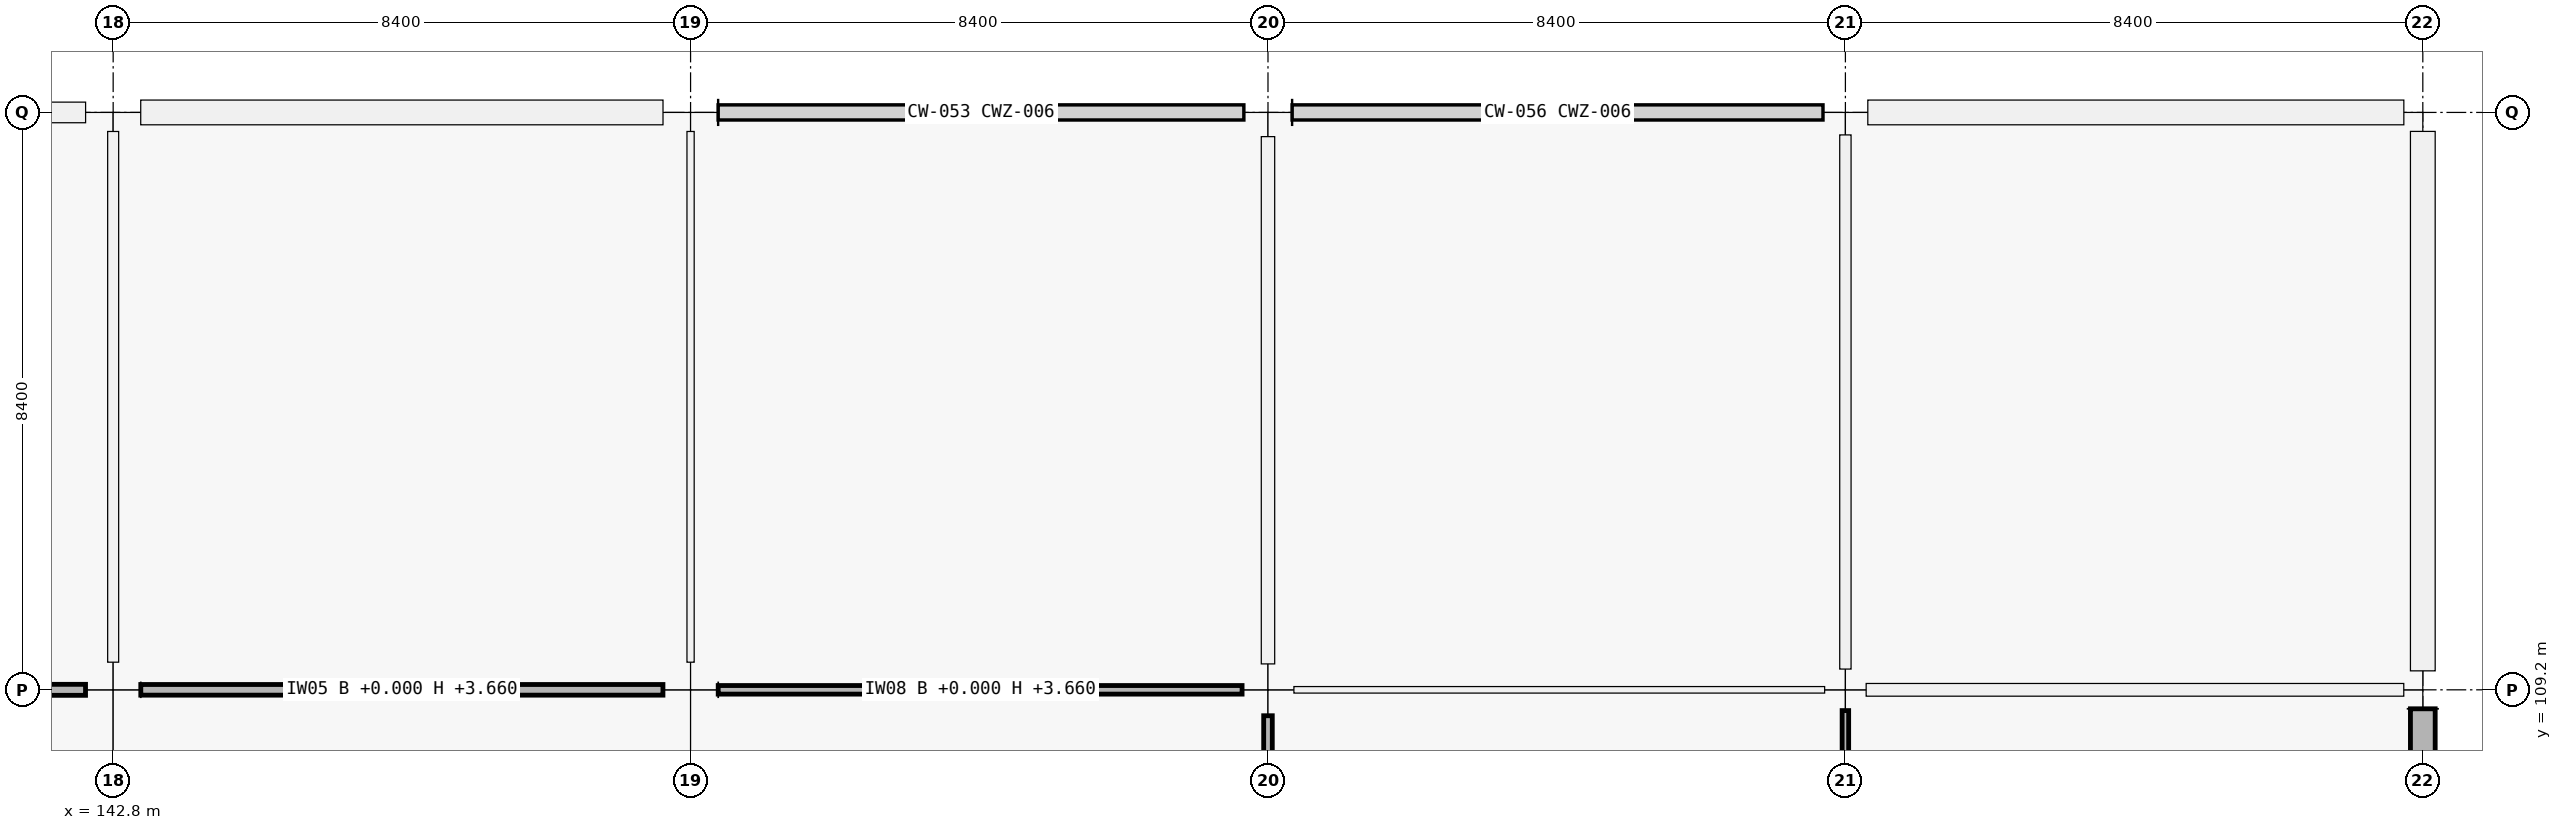
"""IFC4 building model, lengths in metres.
Left out: names, types, materials, properties, quantities, classifications, styles, units other than length and angle.
Written with IfcOpenShell. Run it as: python <this file> out.ifc"""

import sys

from ifc_helpers import new_model, si_unit, direction, frame, frame_2d, origin, origin_2d, place, context, subcontext, project, spatial, rectangle, extrude, element, fill, save


model = new_model("IFC4")
c1 = context("Model", 3, precision=1e-05, world=origin(), true_north=direction((0.0, 1.0)))
c2 = subcontext(c1, "Body", "Model", "MODEL_VIEW")
j1 = project(units=[si_unit("LENGTHUNIT", "METRE"), si_unit("PLANEANGLEUNIT", "RADIAN")], contexts=[c1])
p1 = place(None, origin())
s1 = spatial("IfcSite", under=j1, at=p1, CompositionType="ELEMENT")
p2 = place(p1, origin())
s2 = spatial("IfcBuilding", under=s1, at=p2, CompositionType="ELEMENT")
p3 = place(p2, origin())
s3 = spatial("IfcBuildingStorey", under=s2, at=p3, CompositionType="ELEMENT", Elevation=0.0)
p4 = place(p3, frame((142.8, 109.2, 0.0), z_axis=(0.0, 0.0, 1.0), x_axis=(1.0, 0.0, 0.0)))
e1 = element("IfcColumn", 1, at=p4, inside=s3, PredefinedType="COLUMN", context=c2, shape_type="SweptSolid", body=[
    extrude(rectangle(XDim=0.8, YDim=0.8, at=origin_2d()), origin(), (0.0, 0.0, 1.0), 5.76),
])
p5 = place(p3, frame((142.8, 117.6, 0.0), z_axis=(0.0, 0.0, 1.0), x_axis=(1.0, 0.0, 0.0)))
e2 = element("IfcColumn", 2, at=p5, inside=s3, PredefinedType="COLUMN", context=c2, shape_type="SweptSolid", body=[
    extrude(rectangle(XDim=0.8, YDim=0.55, at=origin_2d()), origin(), (0.0, 0.0, 1.0), 5.76),
])
p6 = place(p3, frame((151.2, 109.2, 0.0), z_axis=(0.0, 0.0, 1.0), x_axis=(1.0, 0.0, 0.0)))
e3 = element("IfcColumn", 3, at=p6, inside=s3, PredefinedType="COLUMN", context=c2, shape_type="SweptSolid", body=[
    extrude(rectangle(XDim=0.8, YDim=0.8, at=origin_2d()), origin(), (0.0, 0.0, 1.0), 5.76),
])
p7 = place(p3, frame((151.2, 117.6, 0.0), z_axis=(0.0, 0.0, 1.0), x_axis=(1.0, 0.0, 0.0)))
e4 = element("IfcColumn", 4, at=p7, inside=s3, PredefinedType="COLUMN", context=c2, shape_type="SweptSolid", body=[
    extrude(rectangle(XDim=0.8, YDim=0.55, at=origin_2d()), origin(), (0.0, 0.0, 1.0), 5.76),
])
p8 = place(p3, frame((159.6, 109.2, 0.0), z_axis=(0.0, 0.0, 1.0), x_axis=(1.0, 0.0, 0.0)))
e5 = element("IfcColumn", 5, at=p8, inside=s3, PredefinedType="COLUMN", context=c2, shape_type="SweptSolid", body=[
    extrude(rectangle(XDim=0.75, YDim=0.75, at=origin_2d()), origin(), (0.0, 0.0, 1.0), 5.76),
])
p9 = place(p3, frame((159.6, 117.6, 0.0), z_axis=(0.0, 0.0, 1.0), x_axis=(1.0, 0.0, 0.0)))
e6 = element("IfcColumn", 6, at=p9, inside=s3, PredefinedType="COLUMN", context=c2, shape_type="SweptSolid", body=[
    extrude(rectangle(XDim=0.7, YDim=0.7, at=origin_2d()), origin(), (0.0, 0.0, 1.0), 5.76),
])
p10 = place(p3, frame((168.0, 109.2, 0.0), z_axis=(0.0, 0.0, 1.0), x_axis=(1.0, 0.0, 0.0)))
e7 = element("IfcColumn", 7, at=p10, inside=s3, PredefinedType="COLUMN", context=c2, shape_type="SweptSolid", body=[
    extrude(rectangle(XDim=0.6, YDim=0.6, at=origin_2d()), origin(), (0.0, 0.0, 1.0), 5.76),
])
p11 = place(p3, frame((168.0, 117.6, 0.0), z_axis=(0.0, 0.0, 1.0), x_axis=(1.0, 0.0, 0.0)))
e8 = element("IfcColumn", 8, at=p11, inside=s3, PredefinedType="COLUMN", context=c2, shape_type="SweptSolid", body=[
    extrude(rectangle(XDim=0.65, YDim=0.65, at=origin_2d()), origin(), (0.0, 0.0, 1.0), 5.76),
])
for number, where, z_axis, x_axis in (
    (9, (176.4, 109.2, 0.0), (0.0, 0.0, 1.0), (1.0, 0.0, 0.0)),
    (10, (176.4, 117.6, 0.0), (0.0, 0.0, 1.0), (1.0, 0.0, 0.0)),
):
    element("IfcColumn", number, at=place(p3, frame(where, z_axis=z_axis, x_axis=x_axis)), inside=s3, PredefinedType="COLUMN", context=c2, shape_type="SweptSolid", body=[
        extrude(rectangle(XDim=0.55, YDim=0.55, at=origin_2d()), origin(), (0.0, 0.0, 1.0), 5.51),
    ])
p12 = place(p3, frame((134.851, 117.6, 0.0), z_axis=(0.0, 0.0, 1.0), x_axis=(1.0, 0.0, 0.0)))
e11 = element("IfcWall", 11, at=p12, inside=s3, PredefinedType="SOLIDWALL", context=c2, shape_type="SweptSolid", body=[
    extrude(rectangle(XDim=7.548, YDim=0.3, at=frame_2d((3.774, 0.0))), origin(), (0.0, 0.0, 1.0), 4.7),
])
p13 = place(p12, frame((2.799, 0.0, 0.9)))
e12 = element("IfcOpeningElement", 12, at=p13, cuts=e11, PredefinedType="OPENING", context=c2, shape_type="SweptSolid", body=[
    extrude(rectangle(XDim=1.95, YDim=1.6, at=frame_2d((0.975, 0.8))), frame((0.0, 0.15, 0.0), z_axis=(0.0, -1.0, 0.0), x_axis=(1.0, 0.0, 0.0)), (0.0, 0.0, 1.0), 0.3),
])
p14 = place(p3, frame((143.201, 117.6, 0.0), z_axis=(0.0, 0.0, 1.0), x_axis=(1.0, 0.0, 0.0)))
e13 = element("IfcWall", 13, at=p14, inside=s3, PredefinedType="SOLIDWALL", context=c2, shape_type="SweptSolid", body=[
    extrude(rectangle(XDim=7.598, YDim=0.36, at=frame_2d((3.799, 0.0))), origin(), (0.0, 0.0, 1.0), 4.7),
])
p15 = place(p14, frame((2.799, 0.0, 0.0)))
e14 = element("IfcOpeningElement", 14, at=p15, cuts=e13, PredefinedType="OPENING", context=c2, shape_type="SweptSolid", body=[
    extrude(rectangle(XDim=2.0, YDim=2.25, at=frame_2d((1.0, 1.125))), frame((0.0, 0.18, 0.0), z_axis=(0.0, -1.0, 0.0), x_axis=(1.0, 0.0, 0.0)), (0.0, 0.0, 1.0), 0.36),
])
p16 = place(p3, frame((176.4, 108.924, 0.0), z_axis=(0.0, 0.0, 1.0), x_axis=(0.0, -1.0, 0.0)))
e15 = element("IfcWall", 15, at=p16, inside=s3, PredefinedType="SOLIDWALL", context=c2, shape_type="SweptSolid", body=[
    extrude(rectangle(XDim=7.848, YDim=0.36, at=frame_2d((3.924, 0.0))), origin(), (0.0, 0.0, 1.0), 4.7),
])
p17 = place(p16, frame((2.824, 0.0, 0.9)))
e16 = element("IfcOpeningElement", 16, at=p17, cuts=e15, PredefinedType="OPENING", context=c2, shape_type="SweptSolid", body=[
    extrude(rectangle(XDim=2.2, YDim=1.35, at=frame_2d((1.1, 0.675))), frame((0.0, 0.18, 0.0), z_axis=(0.0, -1.0, 0.0), x_axis=(1.0, 0.0, 0.0)), (0.0, 0.0, 1.0), 0.36),
])
p18 = place(p3, frame((168.326, 117.6, 0.0), z_axis=(0.0, 0.0, 1.0), x_axis=(1.0, 0.0, 0.0)))
e17 = element("IfcWall", 17, at=p18, inside=s3, PredefinedType="SOLIDWALL", context=c2, shape_type="SweptSolid", body=[
    extrude(rectangle(XDim=7.798, YDim=0.36, at=frame_2d((3.899, 0.0))), origin(), (0.0, 0.0, 1.0), 4.7),
])
p19 = place(p18, frame((2.999, 0.0, 0.9)))
e18 = element("IfcOpeningElement", 18, at=p19, cuts=e17, PredefinedType="OPENING", context=c2, shape_type="SweptSolid", body=[
    extrude(rectangle(XDim=1.8, YDim=1.35, at=frame_2d((0.9, 0.675))), frame((0.0, 0.18, 0.0), z_axis=(0.0, -1.0, 0.0), x_axis=(1.0, 0.0, 0.0)), (0.0, 0.0, 1.0), 0.36),
])
p20 = place(p3, frame((176.4, 117.324, 0.0), z_axis=(0.0, 0.0, 1.0), x_axis=(0.0, -1.0, 0.0)))
e19 = element("IfcWall", 19, at=p20, inside=s3, PredefinedType="SOLIDWALL", context=c2, shape_type="SweptSolid", body=[
    extrude(rectangle(XDim=7.848, YDim=0.36, at=frame_2d((3.924, 0.0))), origin(), (0.0, 0.0, 1.0), 4.7),
])
p21 = place(p20, frame((2.824, 0.0, 0.9)))
e20 = element("IfcOpeningElement", 20, at=p21, cuts=e19, PredefinedType="OPENING", context=c2, shape_type="SweptSolid", body=[
    extrude(rectangle(XDim=2.2, YDim=1.75, at=frame_2d((1.1, 0.875))), frame((0.0, 0.18, 0.0), z_axis=(0.0, -1.0, 0.0), x_axis=(1.0, 0.0, 0.0)), (0.0, 0.0, 1.0), 0.36),
])
p22 = place(p3, frame((134.827, 109.2, 0.0), z_axis=(0.0, 0.0, 1.0), x_axis=(1.0, 0.0, 0.0)))
e21 = element("IfcWall", 21, at=p22, inside=s3, PredefinedType="PARTITIONING", context=c2, shape_type="SweptSolid", body=[
    extrude(rectangle(XDim=7.571, YDim=0.16, at=frame_2d((3.786, 0.0))), origin(), (0.0, 0.0, 1.0), 3.66),
])
p23 = place(p22, frame((3.285, 0.0, 0.0)))
e22 = element("IfcOpeningElement", 22, at=p23, cuts=e21, PredefinedType="OPENING", context=c2, shape_type="SweptSolid", body=[
    extrude(rectangle(XDim=1.0, YDim=2.15, at=frame_2d((0.5, 1.075))), frame((0.0, 0.08, 0.0), z_axis=(0.0, -1.0, 0.0), x_axis=(1.0, 0.0, 0.0)), (0.0, 0.0, 1.0), 0.16),
])
p24 = place(p3, frame((143.202, 109.2, 0.0), z_axis=(0.0, 0.0, 1.0), x_axis=(1.0, 0.0, 0.0)))
e23 = element("IfcWall", 23, at=p24, inside=s3, PredefinedType="PARTITIONING", context=c2, shape_type="SweptSolid", body=[
    extrude(rectangle(XDim=7.596, YDim=0.155, at=frame_2d((3.798, 0.0))), origin(), (0.0, 0.0, 1.0), 3.66),
])
p25 = place(p24, frame((3.333, 0.0, 0.0)))
e24 = element("IfcOpeningElement", 24, at=p25, cuts=e23, PredefinedType="OPENING", context=c2, shape_type="SweptSolid", body=[
    extrude(rectangle(XDim=0.93, YDim=2.12, at=frame_2d((0.465, 1.06))), frame((0.0, 0.078, 0.0), z_axis=(0.0, -1.0, 0.0), x_axis=(1.0, 0.0, 0.0)), (0.0, 0.0, 1.0), 0.155),
])
p26 = place(p3, frame((151.602, 109.2, 0.0), z_axis=(0.0, 0.0, 1.0), x_axis=(1.0, 0.0, 0.0)))
e25 = element("IfcWall", 25, at=p26, inside=s3, PredefinedType="PARTITIONING", context=c2, shape_type="SweptSolid", body=[
    extrude(rectangle(XDim=7.621, YDim=0.125, at=frame_2d((3.811, 0.0))), origin(), (0.0, 0.0, 1.0), 3.66),
])
p27 = place(p26, frame((3.271, 0.0, 0.0)))
e26 = element("IfcOpeningElement", 26, at=p27, cuts=e25, PredefinedType="OPENING", context=c2, shape_type="SweptSolid", body=[
    extrude(rectangle(XDim=1.08, YDim=2.25, at=frame_2d((0.54, 1.125))), frame((0.0, 0.062, 0.0), z_axis=(0.0, -1.0, 0.0), x_axis=(1.0, 0.0, 0.0)), (0.0, 0.0, 1.0), 0.125),
])
p28 = place(p3, frame((159.977, 109.2, 0.0), z_axis=(0.0, 0.0, 1.0), x_axis=(1.0, 0.0, 0.0)))
e27 = element("IfcWall", 27, at=p28, inside=s3, PredefinedType="PARTITIONING", context=c2, shape_type="SweptSolid", body=[
    extrude(rectangle(XDim=7.721, YDim=0.095, at=frame_2d((3.86, 0.0))), origin(), (0.0, 0.0, 1.0), 3.66),
])
p29 = place(p28, frame((3.356, 0.0, 0.0)))
e28 = element("IfcOpeningElement", 28, at=p29, cuts=e27, PredefinedType="OPENING", context=c2, shape_type="SweptSolid", body=[
    extrude(rectangle(XDim=1.01, YDim=2.12, at=frame_2d((0.505, 1.06))), frame((0.0, 0.047, 0.0), z_axis=(0.0, -1.0, 0.0), x_axis=(1.0, 0.0, 0.0)), (0.0, 0.0, 1.0), 0.095),
])
p30 = place(p3, frame((168.302, 109.2, 0.0), z_axis=(0.0, 0.0, 1.0), x_axis=(1.0, 0.0, 0.0)))
e29 = element("IfcWall", 29, at=p30, inside=s3, PredefinedType="PARTITIONING", context=c2, shape_type="SweptSolid", body=[
    extrude(rectangle(XDim=7.821, YDim=0.185, at=frame_2d((3.911, 0.0))), origin(), (0.0, 0.0, 1.0), 3.66),
])
p31 = place(p30, frame((3.401, 0.0, 0.0)))
e30 = element("IfcOpeningElement", 30, at=p31, cuts=e29, PredefinedType="OPENING", context=c2, shape_type="SweptSolid", body=[
    extrude(rectangle(XDim=1.02, YDim=2.2, at=frame_2d((0.51, 1.1))), frame((0.0, 0.093, 0.0), z_axis=(0.0, -1.0, 0.0), x_axis=(1.0, 0.0, 0.0)), (0.0, 0.0, 1.0), 0.185),
])
p32 = place(p3, frame((142.8, 109.602, 0.0), z_axis=(0.0, 0.0, 1.0), x_axis=(0.0, 1.0, 0.0)))
e31 = element("IfcWall", 31, at=p32, inside=s3, PredefinedType="PARTITIONING", context=c2, shape_type="SweptSolid", body=[
    extrude(rectangle(XDim=7.721, YDim=0.16, at=frame_2d((3.86, 0.0))), origin(), (0.0, 0.0, 1.0), 3.66),
])
p33 = place(p32, frame((3.311, 0.0, 0.0)))
e32 = element("IfcOpeningElement", 32, at=p33, cuts=e31, PredefinedType="OPENING", context=c2, shape_type="SweptSolid", body=[
    extrude(rectangle(XDim=1.1, YDim=2.15, at=frame_2d((0.55, 1.075))), frame((0.0, 0.08, 0.0), z_axis=(0.0, -1.0, 0.0), x_axis=(1.0, 0.0, 0.0)), (0.0, 0.0, 1.0), 0.16),
])
p34 = place(p3, frame((151.2, 109.602, 0.0), z_axis=(0.0, 0.0, 1.0), x_axis=(0.0, 1.0, 0.0)))
e33 = element("IfcWall", 33, at=p34, inside=s3, PredefinedType="PARTITIONING", context=c2, shape_type="SweptSolid", body=[
    extrude(rectangle(XDim=7.721, YDim=0.105, at=frame_2d((3.86, 0.0))), origin(), (0.0, 0.0, 1.0), 3.66),
])
p35 = place(p34, frame((3.401, 0.0, 0.0)))
e34 = element("IfcOpeningElement", 34, at=p35, cuts=e33, PredefinedType="OPENING", context=c2, shape_type="SweptSolid", body=[
    extrude(rectangle(XDim=0.92, YDim=2.15, at=frame_2d((0.46, 1.075))), frame((0.0, 0.052, 0.0), z_axis=(0.0, -1.0, 0.0), x_axis=(1.0, 0.0, 0.0)), (0.0, 0.0, 1.0), 0.105),
])
p36 = place(p3, frame((159.6, 101.152, 0.0), z_axis=(0.0, 0.0, 1.0), x_axis=(0.0, 1.0, 0.0)))
e35 = element("IfcWall", 35, at=p36, inside=s3, PredefinedType="PARTITIONING", context=c2, shape_type="SweptSolid", body=[
    extrude(rectangle(XDim=7.671, YDim=0.125, at=frame_2d((3.835, 0.0))), origin(), (0.0, 0.0, 1.0), 3.66),
])
p37 = place(p36, frame((3.311, 0.0, 0.0)))
e36 = element("IfcOpeningElement", 36, at=p37, cuts=e35, PredefinedType="OPENING", context=c2, shape_type="SweptSolid", body=[
    extrude(rectangle(XDim=1.05, YDim=2.12, at=frame_2d((0.525, 1.06))), frame((0.0, 0.062, 0.0), z_axis=(0.0, -1.0, 0.0), x_axis=(1.0, 0.0, 0.0)), (0.0, 0.0, 1.0), 0.125),
])
p38 = place(p3, frame((159.6, 109.577, 0.0), z_axis=(0.0, 0.0, 1.0), x_axis=(0.0, 1.0, 0.0)))
e37 = element("IfcWall", 37, at=p38, inside=s3, PredefinedType="PARTITIONING", context=c2, shape_type="SweptSolid", body=[
    extrude(rectangle(XDim=7.671, YDim=0.195, at=frame_2d((3.835, 0.0))), origin(), (0.0, 0.0, 1.0), 3.66),
])
p39 = place(p38, frame((3.351, 0.0, 0.0)))
e38 = element("IfcOpeningElement", 38, at=p39, cuts=e37, PredefinedType="OPENING", context=c2, shape_type="SweptSolid", body=[
    extrude(rectangle(XDim=0.97, YDim=2.12, at=frame_2d((0.485, 1.06))), frame((0.0, 0.098, 0.0), z_axis=(0.0, -1.0, 0.0), x_axis=(1.0, 0.0, 0.0)), (0.0, 0.0, 1.0), 0.195),
])
p40 = place(p3, frame((168.0, 101.127, 0.0), z_axis=(0.0, 0.0, 1.0), x_axis=(0.0, 1.0, 0.0)))
e39 = element("IfcWall", 39, at=p40, inside=s3, PredefinedType="PARTITIONING", context=c2, shape_type="SweptSolid", body=[
    extrude(rectangle(XDim=7.771, YDim=0.095, at=frame_2d((3.885, 0.0))), origin(), (0.0, 0.0, 1.0), 3.66),
])
p41 = place(p40, frame((3.385, 0.0, 0.0)))
e40 = element("IfcOpeningElement", 40, at=p41, cuts=e39, PredefinedType="OPENING", context=c2, shape_type="SweptSolid", body=[
    extrude(rectangle(XDim=1.0, YDim=2.2, at=frame_2d((0.5, 1.1))), frame((0.0, 0.047, 0.0), z_axis=(0.0, -1.0, 0.0), x_axis=(1.0, 0.0, 0.0)), (0.0, 0.0, 1.0), 0.095),
])
p42 = place(p3, frame((168.0, 109.502, 0.0), z_axis=(0.0, 0.0, 1.0), x_axis=(0.0, 1.0, 0.0)))
e41 = element("IfcWall", 41, at=p42, inside=s3, PredefinedType="PARTITIONING", context=c2, shape_type="SweptSolid", body=[
    extrude(rectangle(XDim=7.771, YDim=0.165, at=frame_2d((3.885, 0.0))), origin(), (0.0, 0.0, 1.0), 3.66),
])
p43 = place(p42, frame((3.365, 0.0, 0.0)))
e42 = element("IfcOpeningElement", 42, at=p43, cuts=e41, PredefinedType="OPENING", context=c2, shape_type="SweptSolid", body=[
    extrude(rectangle(XDim=1.04, YDim=2.2, at=frame_2d((0.52, 1.1))), frame((0.0, 0.083, 0.0), z_axis=(0.0, -1.0, 0.0), x_axis=(1.0, 0.0, 0.0)), (0.0, 0.0, 1.0), 0.165),
])
p44 = place(p15, origin())
e43 = element("IfcDoor", 43, at=p44, inside=s3, OperationType="DOUBLE_DOOR_SINGLE_SWING", PredefinedType="DOOR", context=c2, shape_type="SweptSolid", body=[
    extrude(rectangle(XDim=2.0, YDim=2.25, at=frame_2d((1.0, 1.125))), frame((0.0, 0.025, 0.0), z_axis=(0.0, -1.0, 0.0), x_axis=(1.0, 0.0, 0.0)), (0.0, 0.0, 1.0), 0.05),
])
fill(e14, e43)
p45 = place(p19, origin())
e44 = element("IfcWindow", 44, at=p45, inside=s3, PartitioningType="SINGLE_PANEL", PredefinedType="WINDOW", context=c2, shape_type="SweptSolid", body=[
    extrude(rectangle(XDim=1.8, YDim=1.35, at=frame_2d((0.9, 0.675))), frame((0.0, 0.03, 0.0), z_axis=(0.0, -1.0, 0.0), x_axis=(1.0, 0.0, 0.0)), (0.0, 0.0, 1.0), 0.06),
])
fill(e18, e44)
p46 = place(p21, origin())
e45 = element("IfcWindow", 45, at=p46, inside=s3, PartitioningType="SINGLE_PANEL", PredefinedType="WINDOW", context=c2, shape_type="SweptSolid", body=[
    extrude(rectangle(XDim=2.2, YDim=1.75, at=frame_2d((1.1, 0.875))), frame((0.0, 0.03, 0.0), z_axis=(0.0, -1.0, 0.0), x_axis=(1.0, 0.0, 0.0)), (0.0, 0.0, 1.0), 0.06),
])
fill(e20, e45)
p47 = place(p25, origin())
e46 = element("IfcDoor", 46, at=p47, inside=s3, OperationType="SINGLE_SWING_LEFT", PredefinedType="DOOR", context=c2, shape_type="SweptSolid", body=[
    extrude(rectangle(XDim=0.93, YDim=2.12, at=frame_2d((0.465, 1.06))), frame((0.0, 0.025, 0.0), z_axis=(0.0, -1.0, 0.0), x_axis=(1.0, 0.0, 0.0)), (0.0, 0.0, 1.0), 0.05),
])
fill(e24, e46)
p48 = place(p27, origin())
e47 = element("IfcDoor", 47, at=p48, inside=s3, OperationType="SINGLE_SWING_RIGHT", PredefinedType="DOOR", context=c2, shape_type="SweptSolid", body=[
    extrude(rectangle(XDim=1.08, YDim=2.25, at=frame_2d((0.54, 1.125))), frame((0.0, 0.025, 0.0), z_axis=(0.0, -1.0, 0.0), x_axis=(1.0, 0.0, 0.0)), (0.0, 0.0, 1.0), 0.05),
])
fill(e26, e47)
p49 = place(p29, origin())
e48 = element("IfcDoor", 48, at=p49, inside=s3, OperationType="SINGLE_SWING_LEFT", PredefinedType="DOOR", context=c2, shape_type="SweptSolid", body=[
    extrude(rectangle(XDim=1.01, YDim=2.12, at=frame_2d((0.505, 1.06))), frame((0.0, 0.025, 0.0), z_axis=(0.0, -1.0, 0.0), x_axis=(1.0, 0.0, 0.0)), (0.0, 0.0, 1.0), 0.05),
])
fill(e28, e48)
p50 = place(p31, origin())
e49 = element("IfcDoor", 49, at=p50, inside=s3, OperationType="SINGLE_SWING_LEFT", PredefinedType="DOOR", context=c2, shape_type="SweptSolid", body=[
    extrude(rectangle(XDim=1.02, YDim=2.2, at=frame_2d((0.51, 1.1))), frame((0.0, 0.025, 0.0), z_axis=(0.0, -1.0, 0.0), x_axis=(1.0, 0.0, 0.0)), (0.0, 0.0, 1.0), 0.05),
])
fill(e30, e49)
p51 = place(p33, origin())
e50 = element("IfcDoor", 50, at=p51, inside=s3, OperationType="SINGLE_SWING_RIGHT", PredefinedType="DOOR", context=c2, shape_type="SweptSolid", body=[
    extrude(rectangle(XDim=1.1, YDim=2.15, at=frame_2d((0.55, 1.075))), frame((0.0, 0.025, 0.0), z_axis=(0.0, -1.0, 0.0), x_axis=(1.0, 0.0, 0.0)), (0.0, 0.0, 1.0), 0.05),
])
fill(e32, e50)
p52 = place(p35, origin())
e51 = element("IfcDoor", 51, at=p52, inside=s3, OperationType="SINGLE_SWING_RIGHT", PredefinedType="DOOR", context=c2, shape_type="SweptSolid", body=[
    extrude(rectangle(XDim=0.92, YDim=2.15, at=frame_2d((0.46, 1.075))), frame((0.0, 0.025, 0.0), z_axis=(0.0, -1.0, 0.0), x_axis=(1.0, 0.0, 0.0)), (0.0, 0.0, 1.0), 0.05),
])
fill(e34, e51)
p53 = place(p39, origin())
e52 = element("IfcDoor", 52, at=p53, inside=s3, OperationType="SINGLE_SWING_LEFT", PredefinedType="DOOR", context=c2, shape_type="SweptSolid", body=[
    extrude(rectangle(XDim=0.97, YDim=2.12, at=frame_2d((0.485, 1.06))), frame((0.0, 0.025, 0.0), z_axis=(0.0, -1.0, 0.0), x_axis=(1.0, 0.0, 0.0)), (0.0, 0.0, 1.0), 0.05),
])
fill(e38, e52)
p54 = place(p43, origin())
e53 = element("IfcDoor", 53, at=p54, inside=s3, OperationType="SINGLE_SWING_LEFT", PredefinedType="DOOR", context=c2, shape_type="SweptSolid", body=[
    extrude(rectangle(XDim=1.04, YDim=2.2, at=frame_2d((0.52, 1.1))), frame((0.0, 0.025, 0.0), z_axis=(0.0, -1.0, 0.0), x_axis=(1.0, 0.0, 0.0)), (0.0, 0.0, 1.0), 0.05),
])
fill(e42, e53)
save(model, sys.argv[1])
